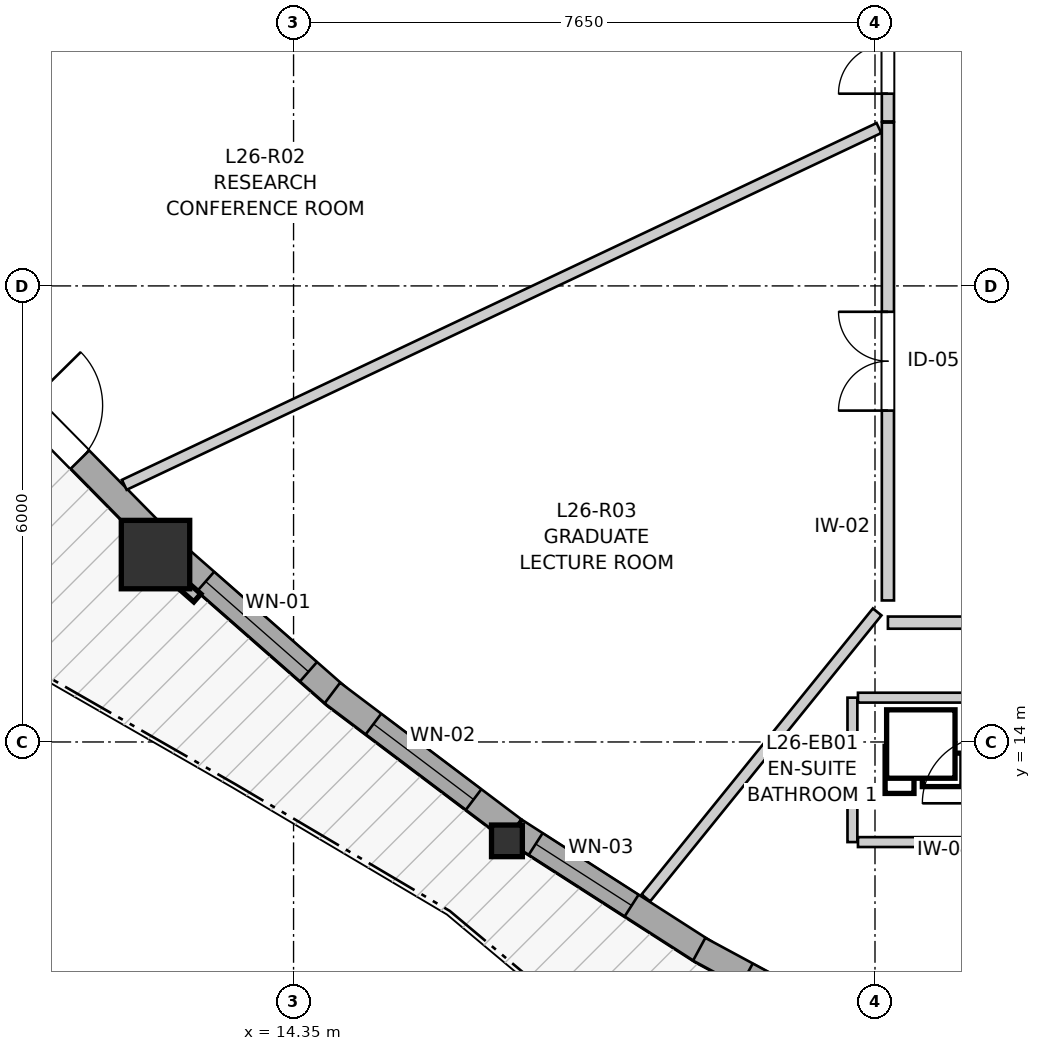
"""IFC4 building model, lengths in metres.
Left out: names, types, materials, properties, quantities, classifications, styles, units other than length and angle.
Written with IfcOpenShell. Run it as: python <this file> out.ifc"""

import sys

from ifc_helpers import new_model, si_unit, direction, frame, frame_2d, origin, origin_2d, place, context, subcontext, project, spatial, rectangle, i_section, extrude, source, transform, mapped, element, fill, save


model = new_model("IFC4")
c1 = context("Model", 3, precision=1e-05, world=origin(), true_north=direction((0.0, 1.0)))
c2 = subcontext(c1, "Body", "Model", "MODEL_VIEW")
j1 = project(units=[si_unit("LENGTHUNIT", "METRE"), si_unit("PLANEANGLEUNIT", "RADIAN")], contexts=[c1])
p1 = place(None, origin())
s1 = spatial("IfcSite", under=j1, at=p1, CompositionType="ELEMENT")
p2 = place(p1, origin())
s2 = spatial("IfcBuilding", under=s1, at=p2, CompositionType="ELEMENT")
p3 = place(p2, frame((0.0, 0.0, 89.6)))
s3 = spatial("IfcBuildingStorey", under=s2, at=p3, CompositionType="ELEMENT", Elevation=89.6)
m1 = source(origin(), c2, "Body", "SweptSolid", [
    extrude(rectangle(XDim=0.9, YDim=0.9, at=origin_2d()), origin(), (0.0, 0.0, 1.0), 2.95),
])
p4 = place(p3, frame((12.534, 16.465, 0.0), z_axis=(0.0, 0.0, 1.0), x_axis=(1.0, 0.0, 0.0)))
e1 = element("IfcColumn", 1, at=p4, inside=s3, PredefinedType="COLUMN", context=c2, shape_type="MappedRepresentation", body=[
    mapped(m1, transform((0.0, 0.0, 0.0), x_axis=(1.0, 0.0, 0.0), y_axis=(0.0, 1.0, 0.0), z_axis=(0.0, 0.0, 1.0), scale=1.0)),
])
m2 = source(origin(), c2, "Body", "SweptSolid", [
    extrude(i_section(OverallWidth=0.406, OverallDepth=0.416, WebThickness=0.027, FlangeThickness=0.044, FilletRadius=0.015, at=origin_2d()), origin(), (0.0, 0.0, 1.0), 2.95),
])
p5 = place(p3, frame((17.157, 12.699, 0.0), z_axis=(0.0, 0.0, 1.0), x_axis=(1.0, 0.0, 0.0)))
e2 = element("IfcColumn", 2, at=p5, inside=s3, PredefinedType="PILASTER", context=c2, shape_type="MappedRepresentation", body=[
    mapped(m2, transform((0.0, 0.0, 0.0), x_axis=(1.0, 0.0, 0.0), y_axis=(0.0, 1.0, 0.0), z_axis=(0.0, 0.0, 1.0), scale=1.0)),
])
p6 = place(p3, frame((10.487, 18.784, 0.0), z_axis=(0.0, 0.0, 1.0), x_axis=(0.701920439278, -0.71225535935, 0.0)))
e3 = element("IfcWall", 3, at=p6, inside=s3, PredefinedType="SOLIDWALL", context=c2, shape_type="SweptSolid", body=[
    extrude(rectangle(XDim=2.858, YDim=0.34, at=frame_2d((1.429, 0.0))), origin(), (0.0, 0.0, 1.0), 2.48),
])
p7 = place(p6, frame((0.5, 0.0, 0.0)))
e4 = element("IfcOpeningElement", 4, at=p7, cuts=e3, PredefinedType="OPENING", context=c2, shape_type="SweptSolid", body=[
    extrude(rectangle(XDim=1.0, YDim=2.1, at=frame_2d((0.5, 1.05))), frame((0.0, 0.18, 0.0), z_axis=(0.0, -1.0, 0.0), x_axis=(1.0, 0.0, 0.0)), (0.0, 0.0, 1.0), 0.36),
])
p8 = place(p3, frame((12.819, 16.441, 0.0), z_axis=(0.0, 0.0, 1.0), x_axis=(0.751471759174, -0.659765257621, 0.0)))
e5 = element("IfcWall", 5, at=p8, inside=s3, PredefinedType="SOLIDWALL", context=c2, shape_type="SweptSolid", body=[
    extrude(rectangle(XDim=2.809, YDim=0.34, at=frame_2d((1.404, 0.0))), origin(), (0.0, 0.0, 1.0), 2.48),
])
p9 = place(p8, frame((0.499, 0.0, 0.82)))
e6 = element("IfcOpeningElement", 6, at=p9, cuts=e5, PredefinedType="OPENING", context=c2, shape_type="SweptSolid", body=[
    extrude(rectangle(XDim=1.8, YDim=1.45, at=frame_2d((0.9, 0.725))), frame((0.0, 0.18, 0.0), z_axis=(0.0, -1.0, 0.0), x_axis=(1.0, 0.0, 0.0)), (0.0, 0.0, 1.0), 0.36),
])
p10 = place(p3, frame((14.861, 14.644, 0.0), z_axis=(0.0, 0.0, 1.0), x_axis=(0.798407246828, -0.602117819212, 0.0)))
e7 = element("IfcWall", 7, at=p10, inside=s3, PredefinedType="SOLIDWALL", context=c2, shape_type="SweptSolid", body=[
    extrude(rectangle(XDim=2.985, YDim=0.34, at=frame_2d((1.493, 0.0))), origin(), (0.0, 0.0, 1.0), 2.48),
])
p11 = place(p10, frame((0.677, 0.0, 0.82)))
e8 = element("IfcOpeningElement", 8, at=p11, cuts=e7, PredefinedType="OPENING", context=c2, shape_type="SweptSolid", body=[
    extrude(rectangle(XDim=1.65, YDim=1.45, at=frame_2d((0.825, 0.725))), frame((0.0, 0.18, 0.0), z_axis=(0.0, -1.0, 0.0), x_axis=(1.0, 0.0, 0.0)), (0.0, 0.0, 1.0), 0.36),
])
p12 = place(p3, frame((17.266, 12.832, 0.0), z_axis=(0.0, 0.0, 1.0), x_axis=(0.841493702039, -0.540266924241, 0.0)))
e9 = element("IfcWall", 9, at=p12, inside=s3, PredefinedType="SOLIDWALL", context=c2, shape_type="SweptSolid", body=[
    extrude(rectangle(XDim=2.968, YDim=0.34, at=frame_2d((1.484, 0.0))), origin(), (0.0, 0.0, 1.0), 2.48),
])
p13 = place(p12, frame((0.321, 0.0, 0.82)))
e10 = element("IfcOpeningElement", 10, at=p13, cuts=e9, PredefinedType="OPENING", context=c2, shape_type="SweptSolid", body=[
    extrude(rectangle(XDim=1.5, YDim=1.45, at=frame_2d((0.75, 0.725))), frame((0.0, 0.18, 0.0), z_axis=(0.0, -1.0, 0.0), x_axis=(1.0, 0.0, 0.0)), (0.0, 0.0, 1.0), 0.36),
])
p14 = place(p3, frame((19.687, 11.273, 0.0), z_axis=(0.0, 0.0, 1.0), x_axis=(0.880115534419, -0.474759566595, 0.0)))
e11 = element("IfcWall", 11, at=p14, inside=s3, PredefinedType="SOLIDWALL", context=c2, shape_type="SweptSolid", body=[
    extrude(rectangle(XDim=2.758, YDim=0.34, at=frame_2d((1.379, 0.0))), origin(), (0.0, 0.0, 1.0), 2.48),
])
p15 = place(p14, frame((0.709, 0.0, 0.82)))
e12 = element("IfcOpeningElement", 12, at=p15, cuts=e11, PredefinedType="OPENING", context=c2, shape_type="SweptSolid", body=[
    extrude(rectangle(XDim=1.35, YDim=1.45, at=frame_2d((0.675, 0.725))), frame((0.0, 0.18, 0.0), z_axis=(0.0, -1.0, 0.0), x_axis=(1.0, 0.0, 0.0)), (0.0, 0.0, 1.0), 0.36),
])
p16 = place(p3, frame((22.17, 15.862, 0.0), z_axis=(0.0, 0.0, 1.0), x_axis=(0.0, 1.0, 0.0)))
e13 = element("IfcWall", 13, at=p16, inside=s3, PredefinedType="PARTITIONING", context=c2, shape_type="SweptSolid", body=[
    extrude(rectangle(XDim=6.287, YDim=0.16, at=frame_2d((3.144, 0.0))), origin(), (0.0, 0.0, 1.0), 2.95),
])
p17 = place(p16, frame((2.498, 0.0, 0.0)))
e14 = element("IfcOpeningElement", 14, at=p17, cuts=e13, PredefinedType="OPENING", context=c2, shape_type="SweptSolid", body=[
    extrude(rectangle(XDim=1.3, YDim=2.1, at=frame_2d((0.65, 1.05))), frame((0.0, 0.09, 0.0), z_axis=(0.0, -1.0, 0.0), x_axis=(1.0, 0.0, 0.0)), (0.0, 0.0, 1.0), 0.18),
])
p18 = place(p3, frame((27.212, 15.57, 0.0), z_axis=(0.0, 0.0, 1.0), x_axis=(-1.0, 0.0, 0.0)))
e15 = element("IfcWall", 15, at=p18, inside=s3, PredefinedType="PARTITIONING", context=c2, shape_type="SweptSolid", body=[
    extrude(rectangle(XDim=5.042, YDim=0.16, at=frame_2d((2.521, 0.0))), origin(), (0.0, 0.0, 1.0), 2.95),
])
p19 = place(p18, frame((2.046, 0.0, 0.0)))
e16 = element("IfcOpeningElement", 16, at=p19, cuts=e15, PredefinedType="OPENING", context=c2, shape_type="SweptSolid", body=[
    extrude(rectangle(XDim=0.92, YDim=2.1, at=frame_2d((0.46, 1.05))), frame((0.0, 0.09, 0.0), z_axis=(0.0, -1.0, 0.0), x_axis=(1.0, 0.0, 0.0)), (0.0, 0.0, 1.0), 0.18),
])
p20 = place(p3, frame((22.17, 22.164, 0.0), z_axis=(0.0, 0.0, 1.0), x_axis=(0.0, 1.0, 0.0)))
e17 = element("IfcWall", 17, at=p20, inside=s3, PredefinedType="PARTITIONING", context=c2, shape_type="SweptSolid", body=[
    extrude(rectangle(XDim=1.986, YDim=0.16, at=frame_2d((0.993, 0.0))), origin(), (0.0, 0.0, 1.0), 2.95),
])
p21 = place(p20, frame((0.365, 0.0, 0.0)))
e18 = element("IfcOpeningElement", 18, at=p21, cuts=e17, PredefinedType="OPENING", context=c2, shape_type="SweptSolid", body=[
    extrude(rectangle(XDim=1.3, YDim=2.1, at=frame_2d((0.65, 1.05))), frame((0.0, 0.09, 0.0), z_axis=(0.0, -1.0, 0.0), x_axis=(1.0, 0.0, 0.0)), (0.0, 0.0, 1.0), 0.18),
])
p22 = place(p3, frame((12.123, 17.383, 0.0), z_axis=(0.0, 0.0, 1.0), x_axis=(0.904049465168, 0.427427847162, 0.0)))
e19 = element("IfcWall", 19, at=p22, inside=s3, PredefinedType="PARTITIONING", context=c2, shape_type="SweptSolid", body=[
    extrude(rectangle(XDim=10.983, YDim=0.145, at=frame_2d((5.491, 0.0))), origin(), (0.0, 0.0, 1.0), 2.95),
])
p23 = place(p3, frame((18.986, 11.948, 0.0), z_axis=(0.0, 0.0, 1.0), x_axis=(0.628820808954, 0.777550249326, 0.0)))
e20 = element("IfcWall", 20, at=p23, inside=s3, PredefinedType="PARTITIONING", context=c2, shape_type="SweptSolid", body=[
    extrude(rectangle(XDim=4.839, YDim=0.145, at=frame_2d((2.419, 0.0))), origin(), (0.0, 0.0, 1.0), 2.95),
])
p24 = place(p3, frame((21.703, 12.683, 0.0), z_axis=(0.0, 0.0, 1.0), x_axis=(0.0, 1.0, 0.0)))
e21 = element("IfcWall", 21, at=p24, inside=s3, PredefinedType="PARTITIONING", context=c2, shape_type="SweptSolid", body=[
    extrude(rectangle(XDim=1.9, YDim=0.13, at=frame_2d((0.95, 0.0))), origin(), (0.0, 0.0, 1.0), 2.95),
])
for number, where, z_axis, x_axis in (
    (22, (21.776, 14.583, 0.0), (0.0, 0.0, 1.0), (1.0, 0.0, 0.0)),
    (23, (21.776, 12.683, 0.0), (0.0, 0.0, 1.0), (1.0, 0.0, 0.0)),
):
    element("IfcWall", number, at=place(p3, frame(where, z_axis=z_axis, x_axis=x_axis)), inside=s3, PredefinedType="PARTITIONING", context=c2, shape_type="SweptSolid", body=[
        extrude(rectangle(XDim=1.654, YDim=0.13, at=frame_2d((0.827, 0.0))), origin(), (0.0, 0.0, 1.0), 2.95),
    ])
m3 = source(origin(), c2, "Body", "SweptSolid", [
    extrude(rectangle(XDim=1.8, YDim=1.45, at=frame_2d((0.9, 0.725))), frame((0.0, 0.03, 0.0), z_axis=(0.0, -1.0, 0.0), x_axis=(1.0, 0.0, 0.0)), (0.0, 0.0, 1.0), 0.06),
])
p25 = place(p9, origin())
e24 = element("IfcWindow", 24, at=p25, inside=s3, PartitioningType="SINGLE_PANEL", PredefinedType="WINDOW", context=c2, shape_type="MappedRepresentation", body=[
    mapped(m3, transform((0.0, 0.0, 0.0), x_axis=(1.0, 0.0, 0.0), y_axis=(0.0, 1.0, 0.0), z_axis=(0.0, 0.0, 1.0), scale=1.0)),
])
fill(e6, e24)
m4 = source(origin(), c2, "Body", "SweptSolid", [
    extrude(rectangle(XDim=1.65, YDim=1.45, at=frame_2d((0.825, 0.725))), frame((0.0, 0.03, 0.0), z_axis=(0.0, -1.0, 0.0), x_axis=(1.0, 0.0, 0.0)), (0.0, 0.0, 1.0), 0.06),
])
p26 = place(p11, origin())
e25 = element("IfcWindow", 25, at=p26, inside=s3, PartitioningType="SINGLE_PANEL", PredefinedType="WINDOW", context=c2, shape_type="MappedRepresentation", body=[
    mapped(m4, transform((0.0, 0.0, 0.0), x_axis=(1.0, 0.0, 0.0), y_axis=(0.0, 1.0, 0.0), z_axis=(0.0, 0.0, 1.0), scale=1.0)),
])
fill(e8, e25)
m5 = source(origin(), c2, "Body", "SweptSolid", [
    extrude(rectangle(XDim=1.5, YDim=1.45, at=frame_2d((0.75, 0.725))), frame((0.0, 0.03, 0.0), z_axis=(0.0, -1.0, 0.0), x_axis=(1.0, 0.0, 0.0)), (0.0, 0.0, 1.0), 0.06),
])
p27 = place(p13, origin())
e26 = element("IfcWindow", 26, at=p27, inside=s3, PartitioningType="SINGLE_PANEL", PredefinedType="WINDOW", context=c2, shape_type="MappedRepresentation", body=[
    mapped(m5, transform((0.0, 0.0, 0.0), x_axis=(1.0, 0.0, 0.0), y_axis=(0.0, 1.0, 0.0), z_axis=(0.0, 0.0, 1.0), scale=1.0)),
])
fill(e10, e26)
m6 = source(origin(), c2, "Body", "SweptSolid", [
    extrude(rectangle(XDim=1.0, YDim=2.1, at=frame_2d((0.5, 1.05))), frame((0.0, 0.025, 0.0), z_axis=(0.0, -1.0, 0.0), x_axis=(1.0, 0.0, 0.0)), (0.0, 0.0, 1.0), 0.05),
])
p28 = place(p7, origin())
e27 = element("IfcDoor", 27, at=p28, inside=s3, OperationType="SINGLE_SWING_LEFT", PredefinedType="DOOR", context=c2, shape_type="MappedRepresentation", body=[
    mapped(m6, transform((0.0, 0.0, 0.0), x_axis=(1.0, 0.0, 0.0), y_axis=(0.0, 1.0, 0.0), z_axis=(0.0, 0.0, 1.0), scale=1.0)),
])
fill(e4, e27)
m7 = source(origin(), c2, "Body", "SweptSolid", [
    extrude(rectangle(XDim=1.3, YDim=2.1, at=frame_2d((0.65, 1.05))), frame((0.0, 0.025, 0.0), z_axis=(0.0, -1.0, 0.0), x_axis=(1.0, 0.0, 0.0)), (0.0, 0.0, 1.0), 0.05),
])
p29 = place(p17, origin())
e28 = element("IfcDoor", 28, at=p29, inside=s3, OperationType="DOUBLE_DOOR_SINGLE_SWING", PredefinedType="DOOR", context=c2, shape_type="MappedRepresentation", body=[
    mapped(m7, transform((0.0, 0.0, 0.0), x_axis=(1.0, 0.0, 0.0), y_axis=(0.0, 1.0, 0.0), z_axis=(0.0, 0.0, 1.0), scale=1.0)),
])
fill(e14, e28)
p30 = place(p21, origin())
e29 = element("IfcDoor", 29, at=p30, inside=s3, OperationType="DOUBLE_DOOR_SINGLE_SWING", PredefinedType="DOOR", context=c2, shape_type="MappedRepresentation", body=[
    mapped(m7, transform((0.0, 0.0, 0.0), x_axis=(1.0, 0.0, 0.0), y_axis=(0.0, 1.0, 0.0), z_axis=(0.0, 0.0, 1.0), scale=1.0)),
])
fill(e18, e29)
save(model, sys.argv[1])
